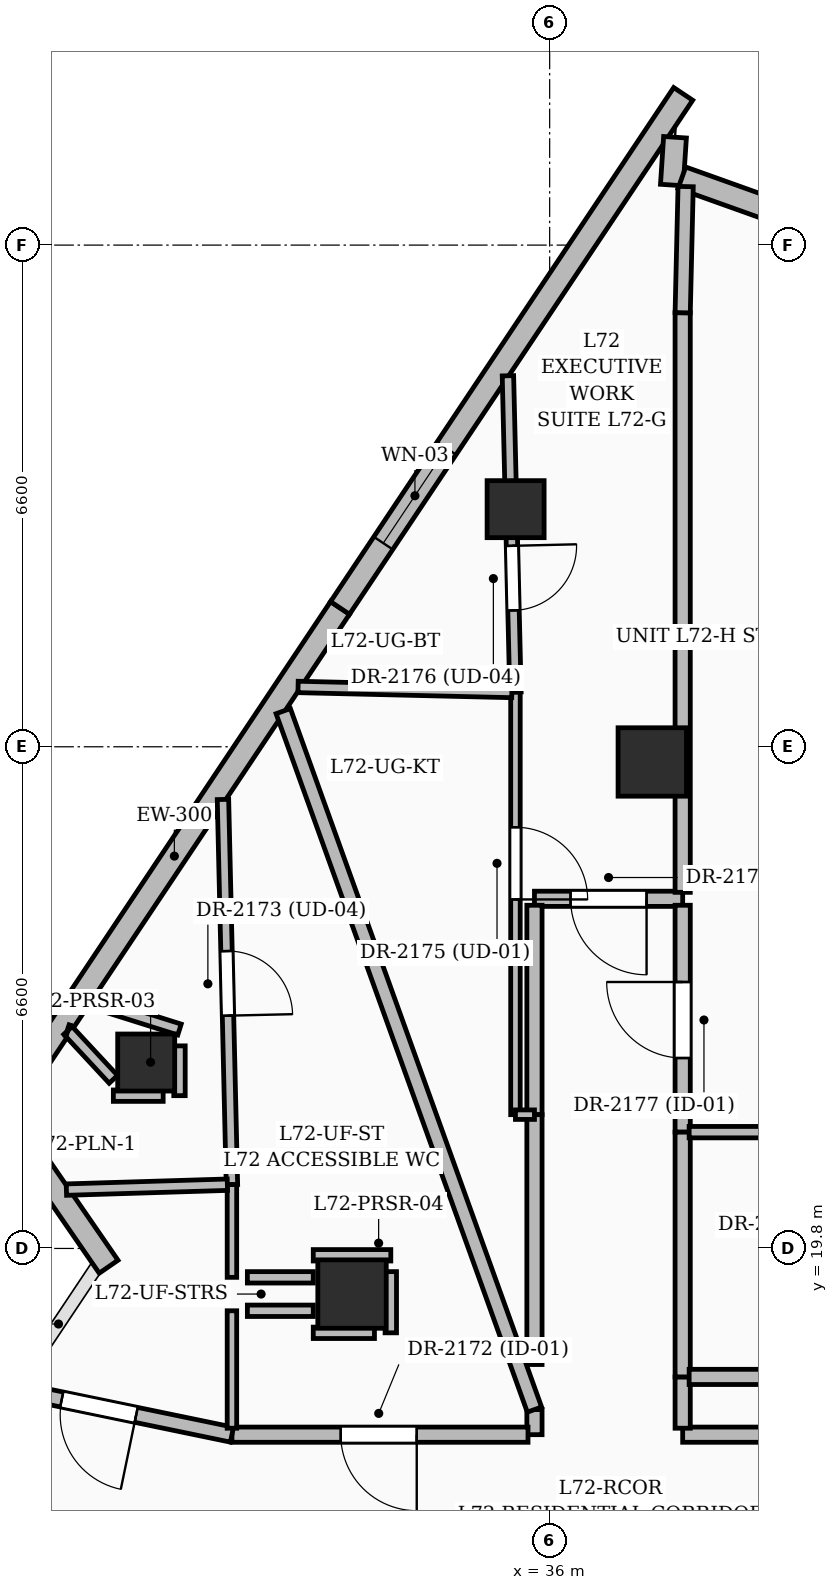
"""IFC4 building model, lengths in metres.
Left out: names, types, materials, properties, quantities, classifications, styles, units other than length and angle.
Written with IfcOpenShell. Run it as: python <this file> out.ifc"""

import sys

from ifc_helpers import new_model, si_unit, direction, frame, frame_2d, origin, origin_2d, place, context, subcontext, project, spatial, rectangle, extrude, element, fill, save


model = new_model("IFC4")
c1 = context("Model", 3, precision=1e-05, world=origin(), true_north=direction((0.0, 1.0)))
c2 = subcontext(c1, "Body", "Model", "MODEL_VIEW")
j1 = project(units=[si_unit("LENGTHUNIT", "METRE"), si_unit("PLANEANGLEUNIT", "RADIAN")], contexts=[c1])
p1 = place(None, origin())
s1 = spatial("IfcSite", under=j1, at=p1, CompositionType="ELEMENT")
p2 = place(p1, origin())
s2 = spatial("IfcBuilding", under=s1, at=p2, CompositionType="ELEMENT")
p3 = place(p2, frame((0.0, 0.0, 278.25)))
s3 = spatial("IfcBuildingStorey", under=s2, at=p3, CompositionType="ELEMENT", Elevation=278.25)
for number, where, z_axis, x_axis in (
    (1, (37.35, 26.2, 0.0), (0.0, 0.0, 1.0), (1.0, 0.0, 0.0)),
    (2, (33.4, 19.2, 0.0), (0.0, 0.0, 1.0), (1.0, 0.0, 0.0)),
):
    element("IfcColumn", number, at=place(p3, frame(where, z_axis=z_axis, x_axis=x_axis)), inside=s3, PredefinedType="COLUMN", context=c2, shape_type="SweptSolid", body=[
        extrude(rectangle(XDim=0.9, YDim=0.9, at=origin_2d()), origin(), (0.0, 0.0, 1.0), 3.75),
    ])
for number, where, z_axis, x_axis in (
    (3, (35.552, 29.526, 0.0), (0.0, 0.0, 1.0), (1.0, 0.0, 0.0)),
    (4, (30.692, 22.246, 0.0), (0.0, 0.0, 1.0), (1.0, 0.0, 0.0)),
):
    element("IfcColumn", number, at=place(p3, frame(where, z_axis=z_axis, x_axis=x_axis)), inside=s3, PredefinedType="COLUMN", context=c2, shape_type="SweptSolid", body=[
        extrude(rectangle(XDim=0.75, YDim=0.75, at=origin_2d()), origin(), (0.0, 0.0, 1.0), 3.75),
    ])
p4 = place(p3, frame((30.198, 19.56, 0.0), z_axis=(0.0, 0.0, 1.0), x_axis=(-0.567515168171, 0.82336294178, 0.0)))
e5 = element("IfcWall", 5, at=p4, inside=s3, PredefinedType="SOLIDWALL", context=c2, shape_type="SweptSolid", body=[
    extrude(rectangle(XDim=2.594, YDim=0.3, at=frame_2d((1.297, 0.0))), origin(), (0.0, 0.0, 1.0), 2.696),
])
p5 = place(p3, frame((28.883, 21.697, 0.0), z_axis=(0.0, 0.0, 1.0), x_axis=(0.555209579516, 0.831710480163, 0.0)))
e6 = element("IfcWall", 6, at=p5, inside=s3, PredefinedType="SOLIDWALL", context=c2, shape_type="SweptSolid", body=[
    extrude(rectangle(XDim=7.851, YDim=0.3, at=frame_2d((3.926, 0.0))), origin(), (0.0, 0.0, 1.0), 3.5),
])
p6 = place(p3, frame((33.242, 28.227, 0.0), z_axis=(0.0, 0.0, 1.0), x_axis=(0.555212816766, 0.831708319123, 0.0)))
e7 = element("IfcWall", 7, at=p6, inside=s3, PredefinedType="SOLIDWALL", context=c2, shape_type="SweptSolid", body=[
    extrude(rectangle(XDim=8.131, YDim=0.3, at=frame_2d((4.066, 0.0))), origin(), (0.0, 0.0, 1.0), 3.5),
])
p7 = place(p6, frame((1.025, 0.0, 0.6)))
e8 = element("IfcOpeningElement", 8, at=p7, cuts=e7, PredefinedType="OPENING", context=c2, shape_type="SweptSolid", body=[
    extrude(rectangle(XDim=1.5, YDim=2.1, at=frame_2d((0.75, 1.05))), frame((0.0, 0.16, 0.0), z_axis=(0.0, -1.0, 0.0), x_axis=(1.0, 0.0, 0.0)), (0.0, 0.0, 1.0), 0.32),
])
p8 = place(p3, frame((37.649, 34.419, 0.0), z_axis=(0.0, 0.0, 1.0), x_axis=(-0.065490172125, -0.997853214333, 0.0)))
e9 = element("IfcWall", 9, at=p8, inside=s3, PredefinedType="SOLIDWALL", context=c2, shape_type="SweptSolid", body=[
    extrude(rectangle(XDim=0.63, YDim=0.3, at=frame_2d((0.315, 0.0))), origin(), (0.0, 0.0, 1.0), 3.5),
])
p9 = place(p3, frame((37.74, 33.886, 0.0), z_axis=(0.0, 0.0, 1.0), x_axis=(0.941667785429, -0.336543878097, 0.0)))
e10 = element("IfcWall", 10, at=p9, inside=s3, PredefinedType="SOLIDWALL", context=c2, shape_type="SweptSolid", body=[
    extrude(rectangle(XDim=2.087, YDim=0.3, at=frame_2d((1.043, 0.0))), origin(), (0.0, 0.0, 1.0), 3.5),
])
p10 = place(p3, frame((46.715, 17.35, 0.0), z_axis=(0.0, 0.0, 1.0), x_axis=(-1.0, 0.0, 0.0)))
e11 = element("IfcWall", 11, at=p10, inside=s3, PredefinedType="PARTITIONING", context=c2, shape_type="SweptSolid", body=[
    extrude(rectangle(XDim=8.965, YDim=0.2, at=frame_2d((4.482, 0.0))), origin(), (0.0, 0.0, 1.0), 2.685),
])
p11 = place(p3, frame((37.75, 17.435, 0.0), z_axis=(0.0, 0.0, 1.0), x_axis=(0.0, 1.0, 0.0)))
e12 = element("IfcWall", 12, at=p11, inside=s3, PredefinedType="PARTITIONING", context=c2, shape_type="SweptSolid", body=[
    extrude(rectangle(XDim=0.675, YDim=0.2, at=frame_2d((0.337, 0.0))), origin(), (0.0, 0.0, 1.0), 3.5),
])
p12 = place(p3, frame((35.8, 17.68, 0.0), z_axis=(0.0, 0.0, 1.0), x_axis=(0.0, -1.0, 0.0)))
e13 = element("IfcWall", 13, at=p12, inside=s3, PredefinedType="PARTITIONING", context=c2, shape_type="SweptSolid", body=[
    extrude(rectangle(XDim=0.33, YDim=0.2, at=frame_2d((0.165, 0.0))), origin(), (0.0, 0.0, 1.0), 3.5),
])
p13 = place(p3, frame((35.715, 17.35, 0.0), z_axis=(0.0, 0.0, 1.0), x_axis=(-1.0, 0.0, 0.0)))
e14 = element("IfcWall", 14, at=p13, inside=s3, PredefinedType="PARTITIONING", context=c2, shape_type="SweptSolid", body=[
    extrude(rectangle(XDim=3.895, YDim=0.2, at=frame_2d((1.948, 0.0))), origin(), (0.0, 0.0, 1.0), 2.685),
])
p14 = place(p13, frame((1.464, 0.0, 0.0)))
e15 = element("IfcOpeningElement", 15, at=p14, cuts=e14, PredefinedType="OPENING", context=c2, shape_type="SweptSolid", body=[
    extrude(rectangle(XDim=1.0, YDim=2.2, at=frame_2d((0.5, 1.1))), frame((0.0, 0.11, 0.0), z_axis=(0.0, -1.0, 0.0), x_axis=(1.0, 0.0, 0.0)), (0.0, 0.0, 1.0), 0.22),
])
p15 = place(p3, frame((31.82, 17.35, 0.0), z_axis=(0.0, 0.0, 1.0), x_axis=(-0.979272191328, 0.202548698567, 0.0)))
e16 = element("IfcWall", 16, at=p15, inside=s3, PredefinedType="PARTITIONING", context=c2, shape_type="SweptSolid", body=[
    extrude(rectangle(XDim=2.837, YDim=0.2, at=frame_2d((1.419, 0.0))), origin(), (0.0, 0.0, 1.0), 3.5),
])
p16 = place(p15, frame((1.286, 0.0, 0.0)))
e17 = element("IfcOpeningElement", 17, at=p16, cuts=e16, PredefinedType="OPENING", context=c2, shape_type="SweptSolid", body=[
    extrude(rectangle(XDim=1.0, YDim=2.2, at=frame_2d((0.5, 1.1))), frame((0.0, 0.11, 0.0), z_axis=(0.0, -1.0, 0.0), x_axis=(1.0, 0.0, 0.0)), (0.0, 0.0, 1.0), 0.22),
])
p17 = place(p3, frame((37.75, 24.4, 0.0), z_axis=(0.0, 0.0, 1.0), x_axis=(-1.0, 0.0, 0.0)))
e18 = element("IfcWall", 18, at=p17, inside=s3, PredefinedType="PARTITIONING", context=c2, shape_type="SweptSolid", body=[
    extrude(rectangle(XDim=1.95, YDim=0.2, at=frame_2d((0.975, 0.0))), origin(), (0.0, 0.0, 1.0), 2.685),
])
p18 = place(p17, frame((0.475, 0.0, 0.0)))
e19 = element("IfcOpeningElement", 19, at=p18, cuts=e18, PredefinedType="OPENING", context=c2, shape_type="SweptSolid", body=[
    extrude(rectangle(XDim=1.0, YDim=2.2, at=frame_2d((0.5, 1.1))), frame((0.0, 0.11, 0.0), z_axis=(0.0, -1.0, 0.0), x_axis=(1.0, 0.0, 0.0)), (0.0, 0.0, 1.0), 0.22),
])
p19 = place(p3, frame((35.8, 24.315, 0.0), z_axis=(0.0, 0.0, 1.0), x_axis=(0.0, -1.0, 0.0)))
e20 = element("IfcWall", 20, at=p19, inside=s3, PredefinedType="PARTITIONING", context=c2, shape_type="SweptSolid", body=[
    extrude(rectangle(XDim=2.755, YDim=0.2, at=frame_2d((1.377, 0.0))), origin(), (0.0, 0.0, 1.0), 2.685),
])
p20 = place(p3, frame((35.8, 21.56, 0.0), z_axis=(0.0, 0.0, 1.0), x_axis=(0.0, -1.0, 0.0)))
e21 = element("IfcWall", 21, at=p20, inside=s3, PredefinedType="PARTITIONING", context=c2, shape_type="SweptSolid", body=[
    extrude(rectangle(XDim=3.287, YDim=0.2, at=frame_2d((1.644, 0.0))), origin(), (0.0, 0.0, 1.0), 3.5),
])
p21 = place(p3, frame((37.75, 21.33, 0.0), z_axis=(0.0, 0.0, 1.0), x_axis=(0.0, 1.0, 0.0)))
e22 = element("IfcWall", 22, at=p21, inside=s3, PredefinedType="PARTITIONING", context=c2, shape_type="SweptSolid", body=[
    extrude(rectangle(XDim=2.985, YDim=0.2, at=frame_2d((1.492, 0.0))), origin(), (0.0, 0.0, 1.0), 3.5),
])
p22 = place(p21, frame((0.975, 0.0, 0.0)))
e23 = element("IfcOpeningElement", 23, at=p22, cuts=e22, PredefinedType="OPENING", context=c2, shape_type="SweptSolid", body=[
    extrude(rectangle(XDim=1.0, YDim=2.2, at=frame_2d((0.5, 1.1))), frame((0.0, 0.11, 0.0), z_axis=(0.0, -1.0, 0.0), x_axis=(1.0, 0.0, 0.0)), (0.0, 0.0, 1.0), 0.22),
])
p23 = place(p3, frame((37.75, 18.11, 0.0), z_axis=(0.0, 0.0, 1.0), x_axis=(0.0, 1.0, 0.0)))
e24 = element("IfcWall", 24, at=p23, inside=s3, PredefinedType="PARTITIONING", context=c2, shape_type="SweptSolid", body=[
    extrude(rectangle(XDim=3.22, YDim=0.2, at=frame_2d((1.61, 0.0))), origin(), (0.0, 0.0, 1.0), 3.5),
])
p24 = place(p3, frame((42.85, 18.11, 0.0), z_axis=(0.0, 0.0, 1.0), x_axis=(-1.0, 0.0, 0.0)))
e25 = element("IfcWall", 25, at=p24, inside=s3, PredefinedType="PARTITIONING", context=c2, shape_type="SweptSolid", body=[
    extrude(rectangle(XDim=5.015, YDim=0.2, at=frame_2d((2.508, 0.0))), origin(), (0.0, 0.0, 1.0), 3.5),
])
p25 = place(p3, frame((31.702, 25.707, 0.0), z_axis=(0.0, 0.0, 1.0), x_axis=(0.023313343879, -0.999728207063, 0.0)))
e26 = element("IfcWall", 26, at=p25, inside=s3, PredefinedType="PARTITIONING", context=c2, shape_type="SweptSolid", body=[
    extrude(rectangle(XDim=5.069, YDim=0.15, at=frame_2d((2.534, 0.0))), origin(), (0.0, 0.0, 1.0), 2.691),
])
p26 = place(p25, frame((1.995, 0.0, 0.0)))
e27 = element("IfcOpeningElement", 27, at=p26, cuts=e26, PredefinedType="OPENING", context=c2, shape_type="SweptSolid", body=[
    extrude(rectangle(XDim=0.85, YDim=2.1, at=frame_2d((0.425, 1.05))), frame((0.0, 0.085, 0.0), z_axis=(0.0, -1.0, 0.0), x_axis=(1.0, 0.0, 0.0)), (0.0, 0.0, 1.0), 0.17),
])
p27 = place(p3, frame((31.82, 18.98, 0.0), z_axis=(0.0, 0.0, 1.0), x_axis=(0.0, -1.0, 0.0)))
e28 = element("IfcWall", 28, at=p27, inside=s3, PredefinedType="PARTITIONING", context=c2, shape_type="SweptSolid", body=[
    extrude(rectangle(XDim=1.545, YDim=0.125, at=frame_2d((0.772, 0.0))), origin(), (0.0, 0.0, 1.0), 3.5),
])
p28 = place(p3, frame((31.82, 20.64, 0.0), z_axis=(0.0, 0.0, 1.0), x_axis=(0.0, -1.0, 0.0)))
e29 = element("IfcWall", 29, at=p28, inside=s3, PredefinedType="PARTITIONING", context=c2, shape_type="SweptSolid", body=[
    extrude(rectangle(XDim=1.22, YDim=0.125, at=frame_2d((0.61, 0.0))), origin(), (0.0, 0.0, 1.0), 3.5),
])
p29 = place(p3, frame((35.8, 17.68, 0.0), z_axis=(0.0, 0.0, 1.0), x_axis=(-0.338438811441, 0.94098840105, 0.0)))
e30 = element("IfcWall", 30, at=p29, inside=s3, PredefinedType="PARTITIONING", context=c2, shape_type="SweptSolid", body=[
    extrude(rectangle(XDim=9.765, YDim=0.2, at=frame_2d((4.883, 0.0))), origin(), (0.0, 0.0, 1.0), 2.685),
])
p30 = place(p3, frame((29.642, 20.574, 0.0), z_axis=(0.0, 0.0, 1.0), x_axis=(0.999533749868, 0.030533307633, 0.0)))
e31 = element("IfcWall", 31, at=p30, inside=s3, PredefinedType="PARTITIONING", context=c2, shape_type="SweptSolid", body=[
    extrude(rectangle(XDim=2.119, YDim=0.15, at=frame_2d((1.06, 0.0))), origin(), (0.0, 0.0, 1.0), 2.691),
])
p31 = place(p3, frame((35.55, 27.12, 0.0), z_axis=(0.0, 0.0, 1.0), x_axis=(0.0, -1.0, 0.0)))
e32 = element("IfcWall", 32, at=p31, inside=s3, PredefinedType="PARTITIONING", context=c2, shape_type="SweptSolid", body=[
    extrude(rectangle(XDim=5.56, YDim=0.125, at=frame_2d((2.78, 0.0))), origin(), (0.0, 0.0, 1.0), 2.685),
])
p32 = place(p31, frame((1.778, 0.0, 0.0)))
e33 = element("IfcOpeningElement", 33, at=p32, cuts=e32, PredefinedType="OPENING", context=c2, shape_type="SweptSolid", body=[
    extrude(rectangle(XDim=0.95, YDim=2.2, at=frame_2d((0.475, 1.1))), frame((0.0, 0.072, 0.0), z_axis=(0.0, -1.0, 0.0), x_axis=(1.0, 0.0, 0.0)), (0.0, 0.0, 1.0), 0.145),
])
p33 = place(p3, frame((35.55, 21.56, 0.0), z_axis=(0.0, 0.0, 1.0), x_axis=(1.0, 0.0, 0.0)))
e34 = element("IfcWall", 34, at=p33, inside=s3, PredefinedType="PARTITIONING", context=c2, shape_type="SweptSolid", body=[
    extrude(rectangle(XDim=0.25, YDim=0.125, at=frame_2d((0.125, 0.0))), origin(), (0.0, 0.0, 1.0), 3.5),
])
p34 = place(p3, frame((35.451, 31.281, 0.0), z_axis=(0.0, 0.0, 1.0), x_axis=(0.023815340496, -0.999716374557, 0.0)))
e35 = element("IfcWall", 35, at=p34, inside=s3, PredefinedType="PARTITIONING", context=c2, shape_type="SweptSolid", body=[
    extrude(rectangle(XDim=4.162, YDim=0.15, at=frame_2d((2.081, 0.0))), origin(), (0.0, 0.0, 1.0), 2.937),
])
p35 = place(p34, frame((2.238, 0.0, 0.0)))
e36 = element("IfcOpeningElement", 36, at=p35, cuts=e35, PredefinedType="OPENING", context=c2, shape_type="SweptSolid", body=[
    extrude(rectangle(XDim=0.85, YDim=2.1, at=frame_2d((0.425, 1.05))), frame((0.0, 0.085, 0.0), z_axis=(0.0, -1.0, 0.0), x_axis=(1.0, 0.0, 0.0)), (0.0, 0.0, 1.0), 0.17),
])
p36 = place(p3, frame((37.75, 24.485, 0.0), z_axis=(0.0, 0.0, 1.0), x_axis=(0.0, 1.0, 0.0)))
e37 = element("IfcWall", 37, at=p36, inside=s3, PredefinedType="PARTITIONING", context=c2, shape_type="SweptSolid", body=[
    extrude(rectangle(XDim=7.625, YDim=0.2, at=frame_2d((3.812, 0.0))), origin(), (0.0, 0.0, 1.0), 2.685),
])
p37 = place(p3, frame((37.75, 32.11, 0.0), z_axis=(0.0, 0.0, 1.0), x_axis=(0.02352635898, 0.999723216912, 0.0)))
e38 = element("IfcWall", 38, at=p37, inside=s3, PredefinedType="PARTITIONING", context=c2, shape_type="SweptSolid", body=[
    extrude(rectangle(XDim=1.66, YDim=0.2, at=frame_2d((0.83, 0.0))), origin(), (0.0, 0.0, 1.0), 3.5),
])
p38 = place(p3, frame((35.502, 27.121, 0.0), z_axis=(0.0, 0.0, 1.0), x_axis=(-0.999723418313, 0.023517799163, 0.0)))
e39 = element("IfcWall", 39, at=p38, inside=s3, PredefinedType="PARTITIONING", context=c2, shape_type="SweptSolid", body=[
    extrude(rectangle(XDim=2.813, YDim=0.15, at=frame_2d((1.407, 0.0))), origin(), (0.0, 0.0, 1.0), 2.691),
])
p39 = place(p3, frame((37.835, 21.33, 0.0), z_axis=(0.0, 0.0, 1.0), x_axis=(1.0, 0.0, 0.0)))
e40 = element("IfcWall", 40, at=p39, inside=s3, PredefinedType="PARTITIONING", context=c2, shape_type="SweptSolid", body=[
    extrude(rectangle(XDim=4.968, YDim=0.15, at=frame_2d((2.484, 0.0))), origin(), (0.0, 0.0, 1.0), 3.5),
])
p40 = place(p39, frame((2.04, 0.0, 0.0)))
e41 = element("IfcOpeningElement", 41, at=p40, cuts=e40, PredefinedType="OPENING", context=c2, shape_type="SweptSolid", body=[
    extrude(rectangle(XDim=0.85, YDim=2.1, at=frame_2d((0.425, 1.05))), frame((0.0, 0.085, 0.0), z_axis=(0.0, -1.0, 0.0), x_axis=(1.0, 0.0, 0.0)), (0.0, 0.0, 1.0), 0.17),
])
p41 = place(p3, frame((29.901, 23.041, 0.0), z_axis=(0.0, 0.0, 1.0), x_axis=(0.757409961601, -0.652939622069, 0.0)))
e42 = element("IfcWall", 42, at=p41, inside=s3, PredefinedType="PARTITIONING", context=c2, shape_type="SweptSolid", body=[
    extrude(rectangle(XDim=0.009, YDim=0.15, at=frame_2d((0.005, 0.0))), origin(), (0.0, 0.0, 1.0), 3.5),
])
p42 = place(p3, frame((29.939, 23.055, 0.0), z_axis=(0.0, 0.0, 1.0), x_axis=(0.953830579819, -0.300345176425, 0.0)))
e43 = element("IfcWall", 43, at=p42, inside=s3, PredefinedType="PARTITIONING", context=c2, shape_type="SweptSolid", body=[
    extrude(rectangle(XDim=1.249, YDim=0.15, at=frame_2d((0.624, 0.0))), origin(), (0.0, 0.0, 1.0), 2.691),
])
p43 = place(p3, frame((31.13, 22.465, 0.0), z_axis=(0.0, 0.0, 1.0), x_axis=(0.0, -1.0, 0.0)))
e44 = element("IfcWall", 44, at=p43, inside=s3, PredefinedType="PARTITIONING", context=c2, shape_type="SweptSolid", body=[
    extrude(rectangle(XDim=0.655, YDim=0.15, at=frame_2d((0.328, 0.0))), origin(), (0.0, 0.0, 1.0), 2.835),
])
p44 = place(p3, frame((30.915, 21.81, 0.0), z_axis=(0.0, 0.0, 1.0), x_axis=(-1.0, 0.0, 0.0)))
e45 = element("IfcWall", 45, at=p44, inside=s3, PredefinedType="PARTITIONING", context=c2, shape_type="SweptSolid", body=[
    extrude(rectangle(XDim=0.655, YDim=0.15, at=frame_2d((0.328, 0.0))), origin(), (0.0, 0.0, 1.0), 2.691),
])
p45 = place(p3, frame((30.26, 22.025, 0.0), z_axis=(0.0, 0.0, 1.0), x_axis=(-0.680323017409, 0.732912404031, 0.0)))
e46 = element("IfcWall", 46, at=p45, inside=s3, PredefinedType="PARTITIONING", context=c2, shape_type="SweptSolid", body=[
    extrude(rectangle(XDim=0.877, YDim=0.15, at=frame_2d((0.439, 0.0))), origin(), (0.0, 0.0, 1.0), 3.5),
])
p46 = place(p3, frame((29.663, 22.668, 0.0), z_axis=(0.0, 0.0, 1.0), x_axis=(-0.951222818949, 0.308504698037, 0.0)))
e47 = element("IfcWall", 47, at=p46, inside=s3, PredefinedType="PARTITIONING", context=c2, shape_type="SweptSolid", body=[
    extrude(rectangle(XDim=0.01, YDim=0.15, at=frame_2d((0.005, 0.0))), origin(), (0.0, 0.0, 1.0), 3.5),
])
p47 = place(p3, frame((32.023, 19.42, 0.0), z_axis=(0.0, 0.0, 1.0), x_axis=(1.0, 0.0, 0.0)))
e48 = element("IfcWall", 48, at=p47, inside=s3, PredefinedType="PARTITIONING", context=c2, shape_type="SweptSolid", body=[
    extrude(rectangle(XDim=0.867, YDim=0.15, at=frame_2d((0.434, 0.0))), origin(), (0.0, 0.0, 1.0), 3.5),
])
p48 = place(p3, frame((32.89, 19.71, 0.0), z_axis=(0.0, 0.0, 1.0), x_axis=(1.0, 0.0, 0.0)))
e49 = element("IfcWall", 49, at=p48, inside=s3, PredefinedType="PARTITIONING", context=c2, shape_type="SweptSolid", body=[
    extrude(rectangle(XDim=1.02, YDim=0.15, at=frame_2d((0.51, 0.0))), origin(), (0.0, 0.0, 1.0), 2.685),
])
p49 = place(p3, frame((33.91, 19.495, 0.0), z_axis=(0.0, 0.0, 1.0), x_axis=(0.0, -1.0, 0.0)))
e50 = element("IfcWall", 50, at=p49, inside=s3, PredefinedType="PARTITIONING", context=c2, shape_type="SweptSolid", body=[
    extrude(rectangle(XDim=0.805, YDim=0.15, at=frame_2d((0.403, 0.0))), origin(), (0.0, 0.0, 1.0), 3.5),
])
p50 = place(p3, frame((33.695, 18.69, 0.0), z_axis=(0.0, 0.0, 1.0), x_axis=(-1.0, 0.0, 0.0)))
e51 = element("IfcWall", 51, at=p50, inside=s3, PredefinedType="PARTITIONING", context=c2, shape_type="SweptSolid", body=[
    extrude(rectangle(XDim=0.805, YDim=0.15, at=frame_2d((0.403, 0.0))), origin(), (0.0, 0.0, 1.0), 2.685),
])
p51 = place(p3, frame((32.89, 18.98, 0.0), z_axis=(0.0, 0.0, 1.0), x_axis=(-1.0, 0.0, 0.0)))
e52 = element("IfcWall", 52, at=p51, inside=s3, PredefinedType="PARTITIONING", context=c2, shape_type="SweptSolid", body=[
    extrude(rectangle(XDim=0.867, YDim=0.15, at=frame_2d((0.434, 0.0))), origin(), (0.0, 0.0, 1.0), 3.5),
])
p52 = place(p7, origin())
e53 = element("IfcWindow", 53, at=p52, inside=s3, PartitioningType="SINGLE_PANEL", PredefinedType="WINDOW", context=c2, shape_type="SweptSolid", body=[
    extrude(rectangle(XDim=1.5, YDim=2.1, at=frame_2d((0.75, 1.05))), frame((0.0, 0.03, 0.0), z_axis=(0.0, -1.0, 0.0), x_axis=(1.0, 0.0, 0.0)), (0.0, 0.0, 1.0), 0.06),
])
fill(e8, e53)
p53 = place(p14, origin())
e54 = element("IfcDoor", 54, at=p53, inside=s3, OperationType="SINGLE_SWING_LEFT", PredefinedType="DOOR", context=c2, shape_type="SweptSolid", body=[
    extrude(rectangle(XDim=1.0, YDim=2.2, at=frame_2d((0.5, 1.1))), frame((0.0, 0.025, 0.0), z_axis=(0.0, -1.0, 0.0), x_axis=(1.0, 0.0, 0.0)), (0.0, 0.0, 1.0), 0.05),
])
fill(e15, e54)
p54 = place(p26, origin())
e55 = element("IfcDoor", 55, at=p54, inside=s3, OperationType="SINGLE_SWING_RIGHT", PredefinedType="DOOR", context=c2, shape_type="SweptSolid", body=[
    extrude(rectangle(XDim=0.85, YDim=2.1, at=frame_2d((0.425, 1.05))), frame((0.0, 0.025, 0.0), z_axis=(0.0, -1.0, 0.0), x_axis=(1.0, 0.0, 0.0)), (0.0, 0.0, 1.0), 0.05),
])
fill(e27, e55)
p55 = place(p18, origin())
e56 = element("IfcDoor", 56, at=p55, inside=s3, OperationType="SINGLE_SWING_LEFT", PredefinedType="DOOR", context=c2, shape_type="SweptSolid", body=[
    extrude(rectangle(XDim=1.0, YDim=2.2, at=frame_2d((0.5, 1.1))), frame((0.0, 0.025, 0.0), z_axis=(0.0, -1.0, 0.0), x_axis=(1.0, 0.0, 0.0)), (0.0, 0.0, 1.0), 0.05),
])
fill(e19, e56)
p56 = place(p32, origin())
e57 = element("IfcDoor", 57, at=p56, inside=s3, OperationType="SINGLE_SWING_RIGHT", PredefinedType="DOOR", context=c2, shape_type="SweptSolid", body=[
    extrude(rectangle(XDim=0.95, YDim=2.2, at=frame_2d((0.475, 1.1))), frame((0.0, 0.025, 0.0), z_axis=(0.0, -1.0, 0.0), x_axis=(1.0, 0.0, 0.0)), (0.0, 0.0, 1.0), 0.05),
])
fill(e33, e57)
p57 = place(p35, origin())
e58 = element("IfcDoor", 58, at=p57, inside=s3, OperationType="SINGLE_SWING_LEFT", PredefinedType="DOOR", context=c2, shape_type="SweptSolid", body=[
    extrude(rectangle(XDim=0.85, YDim=2.1, at=frame_2d((0.425, 1.05))), frame((0.0, 0.025, 0.0), z_axis=(0.0, -1.0, 0.0), x_axis=(1.0, 0.0, 0.0)), (0.0, 0.0, 1.0), 0.05),
])
fill(e36, e58)
p58 = place(p22, origin())
e59 = element("IfcDoor", 59, at=p58, inside=s3, OperationType="SINGLE_SWING_RIGHT", PredefinedType="DOOR", context=c2, shape_type="SweptSolid", body=[
    extrude(rectangle(XDim=1.0, YDim=2.2, at=frame_2d((0.5, 1.1))), frame((0.0, 0.025, 0.0), z_axis=(0.0, -1.0, 0.0), x_axis=(1.0, 0.0, 0.0)), (0.0, 0.0, 1.0), 0.05),
])
fill(e23, e59)
p59 = place(p16, origin())
e60 = element("IfcDoor", 60, at=p59, inside=s3, OperationType="SINGLE_SWING_LEFT", PredefinedType="DOOR", context=c2, shape_type="SweptSolid", body=[
    extrude(rectangle(XDim=1.0, YDim=2.2, at=frame_2d((0.5, 1.1))), frame((0.0, 0.025, 0.0), z_axis=(0.0, -1.0, 0.0), x_axis=(1.0, 0.0, 0.0)), (0.0, 0.0, 1.0), 0.05),
])
fill(e17, e60)
save(model, sys.argv[1])
